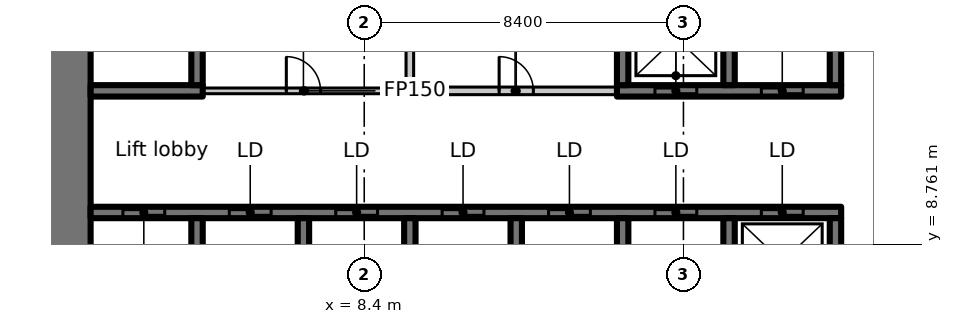
"""IFC4 building model, lengths in metres.
Left out: names, types, materials, properties, quantities, classifications, styles, units other than length and angle.
Written with IfcOpenShell. Run it as: python <this file> out.ifc"""

import sys

from ifc_helpers import new_model, si_unit, direction, frame, frame_2d, origin, place, context, subcontext, project, spatial, rectangle, extrude, element, fill, save


model = new_model("IFC4")
c1 = context("Model", 3, precision=1e-05, world=origin(), true_north=direction((0.0, 1.0)))
c2 = subcontext(c1, "Body", "Model", "MODEL_VIEW")
j1 = project(units=[si_unit("LENGTHUNIT", "METRE"), si_unit("PLANEANGLEUNIT", "RADIAN")], contexts=[c1])
p1 = place(None, origin())
s1 = spatial("IfcSite", under=j1, at=p1, CompositionType="ELEMENT")
p2 = place(p1, origin())
s2 = spatial("IfcBuilding", under=s1, at=p2, CompositionType="ELEMENT")
p3 = place(p2, origin())
s3 = spatial("IfcBuildingStorey", under=s2, at=p3, CompositionType="ELEMENT", Elevation=0.0)
p4 = place(p3, frame((0.6, 6.736, 0.0), z_axis=(0.0, 0.0, 1.0), x_axis=(0.0, 1.0, 0.0)))
e1 = element("IfcWall", 1, at=p4, inside=s3, PredefinedType="SHEAR", context=c2, shape_type="SweptSolid", body=[
    extrude(rectangle(XDim=8.864, YDim=1.2, at=frame_2d((4.432, 0.0))), origin(), (0.0, 0.0, 1.0), 6.75),
])
p5 = place(p3, frame((1.2, 9.6, 0.0), z_axis=(0.0, 0.0, 1.0), x_axis=(1.0, 0.0, 0.0)))
e2 = element("IfcWall", 2, at=p5, inside=s3, PredefinedType="SHEAR", context=c2, shape_type="SweptSolid", body=[
    extrude(rectangle(XDim=19.75, YDim=0.3, at=frame_2d((9.875, 0.0))), origin(), (0.0, 0.0, 1.0), 6.75),
])
p6 = place(p5, frame((0.85, 0.0, 0.0)))
e3 = element("IfcOpeningElement", 3, at=p6, cuts=e2, PredefinedType="OPENING", context=c2, shape_type="SweptSolid", body=[
    extrude(rectangle(XDim=1.1, YDim=2.3, at=frame_2d((0.55, 1.15))), frame((0.0, 0.16, 0.0), z_axis=(0.0, -1.0, 0.0), x_axis=(1.0, 0.0, 0.0)), (0.0, 0.0, 1.0), 0.32),
])
p7 = place(p5, frame((3.65, 0.0, 0.0)))
e4 = element("IfcOpeningElement", 4, at=p7, cuts=e2, PredefinedType="OPENING", context=c2, shape_type="SweptSolid", body=[
    extrude(rectangle(XDim=1.1, YDim=2.3, at=frame_2d((0.55, 1.15))), frame((0.0, 0.16, 0.0), z_axis=(0.0, -1.0, 0.0), x_axis=(1.0, 0.0, 0.0)), (0.0, 0.0, 1.0), 0.32),
])
p8 = place(p5, frame((6.45, 0.0, 0.0)))
e5 = element("IfcOpeningElement", 5, at=p8, cuts=e2, PredefinedType="OPENING", context=c2, shape_type="SweptSolid", body=[
    extrude(rectangle(XDim=1.1, YDim=2.3, at=frame_2d((0.55, 1.15))), frame((0.0, 0.16, 0.0), z_axis=(0.0, -1.0, 0.0), x_axis=(1.0, 0.0, 0.0)), (0.0, 0.0, 1.0), 0.32),
])
p9 = place(p5, frame((9.25, 0.0, 0.0)))
e6 = element("IfcOpeningElement", 6, at=p9, cuts=e2, PredefinedType="OPENING", context=c2, shape_type="SweptSolid", body=[
    extrude(rectangle(XDim=1.1, YDim=2.3, at=frame_2d((0.55, 1.15))), frame((0.0, 0.16, 0.0), z_axis=(0.0, -1.0, 0.0), x_axis=(1.0, 0.0, 0.0)), (0.0, 0.0, 1.0), 0.32),
])
p10 = place(p5, frame((12.05, 0.0, 0.0)))
e7 = element("IfcOpeningElement", 7, at=p10, cuts=e2, PredefinedType="OPENING", context=c2, shape_type="SweptSolid", body=[
    extrude(rectangle(XDim=1.1, YDim=2.3, at=frame_2d((0.55, 1.15))), frame((0.0, 0.16, 0.0), z_axis=(0.0, -1.0, 0.0), x_axis=(1.0, 0.0, 0.0)), (0.0, 0.0, 1.0), 0.32),
])
p11 = place(p5, frame((14.85, 0.0, 0.0)))
e8 = element("IfcOpeningElement", 8, at=p11, cuts=e2, PredefinedType="OPENING", context=c2, shape_type="SweptSolid", body=[
    extrude(rectangle(XDim=1.1, YDim=2.3, at=frame_2d((0.55, 1.15))), frame((0.0, 0.16, 0.0), z_axis=(0.0, -1.0, 0.0), x_axis=(1.0, 0.0, 0.0)), (0.0, 0.0, 1.0), 0.32),
])
p12 = place(p5, frame((17.65, 0.0, 0.0)))
e9 = element("IfcOpeningElement", 9, at=p12, cuts=e2, PredefinedType="OPENING", context=c2, shape_type="SweptSolid", body=[
    extrude(rectangle(XDim=1.1, YDim=2.3, at=frame_2d((0.55, 1.15))), frame((0.0, 0.16, 0.0), z_axis=(0.0, -1.0, 0.0), x_axis=(1.0, 0.0, 0.0)), (0.0, 0.0, 1.0), 0.32),
])
for number, where, z_axis, x_axis in (
    (10, (4.0, 7.15, 0.0), (0.0, 0.0, 1.0), (0.0, 1.0, 0.0)),
    (11, (6.8, 7.15, 0.0), (0.0, 0.0, 1.0), (0.0, 1.0, 0.0)),
    (12, (9.6, 7.15, 0.0), (0.0, 0.0, 1.0), (0.0, 1.0, 0.0)),
    (13, (12.4, 7.15, 0.0), (0.0, 0.0, 1.0), (0.0, 1.0, 0.0)),
    (14, (15.2, 7.15, 0.0), (0.0, 0.0, 1.0), (0.0, 1.0, 0.0)),
    (15, (18.0, 7.15, 0.0), (0.0, 0.0, 1.0), (0.0, 1.0, 0.0)),
    (16, (20.8, 7.15, 0.0), (0.0, 0.0, 1.0), (0.0, 1.0, 0.0)),
):
    element("IfcWall", number, at=place(p3, frame(where, z_axis=z_axis, x_axis=x_axis)), inside=s3, PredefinedType="SHEAR", context=c2, shape_type="SweptSolid", body=[
        extrude(rectangle(XDim=2.3, YDim=0.3, at=frame_2d((1.15, 0.0))), origin(), (0.0, 0.0, 1.0), 6.75),
    ])
p13 = place(p3, frame((1.2, 12.8, 0.0), z_axis=(0.0, 0.0, 1.0), x_axis=(1.0, 0.0, 0.0)))
e17 = element("IfcWall", 17, at=p13, inside=s3, PredefinedType="SHEAR", context=c2, shape_type="SweptSolid", body=[
    extrude(rectangle(XDim=2.95, YDim=0.3, at=frame_2d((1.475, 0.0))), origin(), (0.0, 0.0, 1.0), 6.75),
])
p14 = place(p3, frame((4.0, 12.95, 0.0), z_axis=(0.0, 0.0, 1.0), x_axis=(0.0, 1.0, 0.0)))
e18 = element("IfcWall", 18, at=p14, inside=s3, PredefinedType="SHEAR", context=c2, shape_type="SweptSolid", body=[
    extrude(rectangle(XDim=2.65, YDim=0.3, at=frame_2d((1.325, 0.0))), origin(), (0.0, 0.0, 1.0), 6.75),
])
p15 = place(p3, frame((15.05, 12.8, 0.0), z_axis=(0.0, 0.0, 1.0), x_axis=(1.0, 0.0, 0.0)))
e19 = element("IfcWall", 19, at=p15, inside=s3, PredefinedType="SHEAR", context=c2, shape_type="SweptSolid", body=[
    extrude(rectangle(XDim=5.9, YDim=0.3, at=frame_2d((2.95, 0.0))), origin(), (0.0, 0.0, 1.0), 6.75),
])
p16 = place(p15, frame((1.0, 0.0, 0.0)))
e20 = element("IfcOpeningElement", 20, at=p16, cuts=e19, PredefinedType="OPENING", context=c2, shape_type="SweptSolid", body=[
    extrude(rectangle(XDim=1.1, YDim=2.3, at=frame_2d((0.55, 1.15))), frame((0.0, 0.16, 0.0), z_axis=(0.0, -1.0, 0.0), x_axis=(1.0, 0.0, 0.0)), (0.0, 0.0, 1.0), 0.32),
])
p17 = place(p15, frame((3.8, 0.0, 0.0)))
e21 = element("IfcOpeningElement", 21, at=p17, cuts=e19, PredefinedType="OPENING", context=c2, shape_type="SweptSolid", body=[
    extrude(rectangle(XDim=1.1, YDim=2.3, at=frame_2d((0.55, 1.15))), frame((0.0, 0.16, 0.0), z_axis=(0.0, -1.0, 0.0), x_axis=(1.0, 0.0, 0.0)), (0.0, 0.0, 1.0), 0.32),
])
for number, where, z_axis, x_axis in (
    (22, (15.2, 12.95, 0.0), (0.0, 0.0, 1.0), (0.0, 1.0, 0.0)),
    (23, (18.0, 12.95, 0.0), (0.0, 0.0, 1.0), (0.0, 1.0, 0.0)),
    (24, (20.8, 12.95, 0.0), (0.0, 0.0, 1.0), (0.0, 1.0, 0.0)),
):
    element("IfcWall", number, at=place(p3, frame(where, z_axis=z_axis, x_axis=x_axis)), inside=s3, PredefinedType="SHEAR", context=c2, shape_type="SweptSolid", body=[
        extrude(rectangle(XDim=2.65, YDim=0.3, at=frame_2d((1.325, 0.0))), origin(), (0.0, 0.0, 1.0), 6.75),
    ])
p18 = place(p3, frame((9.6, 15.588, 0.0), z_axis=(0.0, 0.0, 1.0), x_axis=(0.0, -1.0, 0.0)))
e25 = element("IfcWall", 25, at=p18, inside=s3, PredefinedType="PARTITIONING", context=c2, shape_type="SweptSolid", body=[
    extrude(rectangle(XDim=2.788, YDim=0.2, at=frame_2d((1.394, 0.0))), origin(), (0.0, 0.0, 1.0), 6.75),
])
p19 = place(p3, frame((9.7, 12.8, 0.0), z_axis=(0.0, 0.0, 1.0), x_axis=(1.0, 0.0, 0.0)))
e26 = element("IfcWall", 26, at=p19, inside=s3, PredefinedType="PARTITIONING", context=c2, shape_type="SweptSolid", body=[
    extrude(rectangle(XDim=5.338, YDim=0.2, at=frame_2d((2.669, 0.0))), origin(), (0.0, 0.0, 1.0), 6.75),
])
p20 = place(p19, frame((2.25, 0.0, 0.0)))
e27 = element("IfcOpeningElement", 27, at=p20, cuts=e26, PredefinedType="OPENING", context=c2, shape_type="SweptSolid", body=[
    extrude(rectangle(XDim=0.9, YDim=2.1, at=frame_2d((0.45, 1.05))), frame((0.0, 0.11, 0.0), z_axis=(0.0, -1.0, 0.0), x_axis=(1.0, 0.0, 0.0)), (0.0, 0.0, 1.0), 0.22),
])
p21 = place(p3, frame((4.162, 12.8, 0.0), z_axis=(0.0, 0.0, 1.0), x_axis=(1.0, 0.0, 0.0)))
e28 = element("IfcWall", 28, at=p21, inside=s3, PredefinedType="PARTITIONING", context=c2, shape_type="SweptSolid", body=[
    extrude(rectangle(XDim=5.338, YDim=0.15, at=frame_2d((2.669, 0.0))), origin(), (0.0, 0.0, 1.0), 6.75),
])
p22 = place(p21, frame((2.188, 0.0, 0.0)))
e29 = element("IfcOpeningElement", 29, at=p22, cuts=e28, PredefinedType="OPENING", context=c2, shape_type="SweptSolid", body=[
    extrude(rectangle(XDim=0.9, YDim=2.1, at=frame_2d((0.45, 1.05))), frame((0.0, 0.085, 0.0), z_axis=(0.0, -1.0, 0.0), x_axis=(1.0, 0.0, 0.0)), (0.0, 0.0, 1.0), 0.17),
])
p23 = place(p6, origin())
e30 = element("IfcDoor", 30, at=p23, inside=s3, OperationType="SLIDING_TO_LEFT", PredefinedType="DOOR", context=c2, shape_type="SweptSolid", body=[
    extrude(rectangle(XDim=1.1, YDim=2.3, at=frame_2d((0.55, 1.15))), frame((0.0, 0.025, 0.0), z_axis=(0.0, -1.0, 0.0), x_axis=(1.0, 0.0, 0.0)), (0.0, 0.0, 1.0), 0.05),
])
fill(e3, e30)
p24 = place(p7, origin())
e31 = element("IfcDoor", 31, at=p24, inside=s3, OperationType="SLIDING_TO_LEFT", PredefinedType="DOOR", context=c2, shape_type="SweptSolid", body=[
    extrude(rectangle(XDim=1.1, YDim=2.3, at=frame_2d((0.55, 1.15))), frame((0.0, 0.025, 0.0), z_axis=(0.0, -1.0, 0.0), x_axis=(1.0, 0.0, 0.0)), (0.0, 0.0, 1.0), 0.05),
])
fill(e4, e31)
p25 = place(p8, origin())
e32 = element("IfcDoor", 32, at=p25, inside=s3, OperationType="SLIDING_TO_LEFT", PredefinedType="DOOR", context=c2, shape_type="SweptSolid", body=[
    extrude(rectangle(XDim=1.1, YDim=2.3, at=frame_2d((0.55, 1.15))), frame((0.0, 0.025, 0.0), z_axis=(0.0, -1.0, 0.0), x_axis=(1.0, 0.0, 0.0)), (0.0, 0.0, 1.0), 0.05),
])
fill(e5, e32)
p26 = place(p9, origin())
e33 = element("IfcDoor", 33, at=p26, inside=s3, OperationType="SLIDING_TO_LEFT", PredefinedType="DOOR", context=c2, shape_type="SweptSolid", body=[
    extrude(rectangle(XDim=1.1, YDim=2.3, at=frame_2d((0.55, 1.15))), frame((0.0, 0.025, 0.0), z_axis=(0.0, -1.0, 0.0), x_axis=(1.0, 0.0, 0.0)), (0.0, 0.0, 1.0), 0.05),
])
fill(e6, e33)
p27 = place(p10, origin())
e34 = element("IfcDoor", 34, at=p27, inside=s3, OperationType="SLIDING_TO_LEFT", PredefinedType="DOOR", context=c2, shape_type="SweptSolid", body=[
    extrude(rectangle(XDim=1.1, YDim=2.3, at=frame_2d((0.55, 1.15))), frame((0.0, 0.025, 0.0), z_axis=(0.0, -1.0, 0.0), x_axis=(1.0, 0.0, 0.0)), (0.0, 0.0, 1.0), 0.05),
])
fill(e7, e34)
p28 = place(p11, origin())
e35 = element("IfcDoor", 35, at=p28, inside=s3, OperationType="SLIDING_TO_LEFT", PredefinedType="DOOR", context=c2, shape_type="SweptSolid", body=[
    extrude(rectangle(XDim=1.1, YDim=2.3, at=frame_2d((0.55, 1.15))), frame((0.0, 0.025, 0.0), z_axis=(0.0, -1.0, 0.0), x_axis=(1.0, 0.0, 0.0)), (0.0, 0.0, 1.0), 0.05),
])
fill(e8, e35)
p29 = place(p12, origin())
e36 = element("IfcDoor", 36, at=p29, inside=s3, OperationType="SLIDING_TO_LEFT", PredefinedType="DOOR", context=c2, shape_type="SweptSolid", body=[
    extrude(rectangle(XDim=1.1, YDim=2.3, at=frame_2d((0.55, 1.15))), frame((0.0, 0.025, 0.0), z_axis=(0.0, -1.0, 0.0), x_axis=(1.0, 0.0, 0.0)), (0.0, 0.0, 1.0), 0.05),
])
fill(e9, e36)
p30 = place(p16, origin())
e37 = element("IfcDoor", 37, at=p30, inside=s3, OperationType="SLIDING_TO_LEFT", PredefinedType="DOOR", context=c2, shape_type="SweptSolid", body=[
    extrude(rectangle(XDim=1.1, YDim=2.3, at=frame_2d((0.55, 1.15))), frame((0.0, 0.025, 0.0), z_axis=(0.0, -1.0, 0.0), x_axis=(1.0, 0.0, 0.0)), (0.0, 0.0, 1.0), 0.05),
])
fill(e20, e37)
p31 = place(p17, origin())
e38 = element("IfcDoor", 38, at=p31, inside=s3, OperationType="SLIDING_TO_LEFT", PredefinedType="DOOR", context=c2, shape_type="SweptSolid", body=[
    extrude(rectangle(XDim=1.1, YDim=2.3, at=frame_2d((0.55, 1.15))), frame((0.0, 0.025, 0.0), z_axis=(0.0, -1.0, 0.0), x_axis=(1.0, 0.0, 0.0)), (0.0, 0.0, 1.0), 0.05),
])
fill(e21, e38)
p32 = place(p22, origin())
e39 = element("IfcDoor", 39, at=p32, inside=s3, OperationType="SINGLE_SWING_RIGHT", PredefinedType="DOOR", context=c2, shape_type="SweptSolid", body=[
    extrude(rectangle(XDim=0.9, YDim=2.1, at=frame_2d((0.45, 1.05))), frame((0.0, 0.025, 0.0), z_axis=(0.0, -1.0, 0.0), x_axis=(1.0, 0.0, 0.0)), (0.0, 0.0, 1.0), 0.05),
])
fill(e29, e39)
p33 = place(p20, origin())
e40 = element("IfcDoor", 40, at=p33, inside=s3, OperationType="SINGLE_SWING_LEFT", PredefinedType="DOOR", context=c2, shape_type="SweptSolid", body=[
    extrude(rectangle(XDim=0.9, YDim=2.1, at=frame_2d((0.45, 1.05))), frame((0.0, 0.025, 0.0), z_axis=(0.0, -1.0, 0.0), x_axis=(1.0, 0.0, 0.0)), (0.0, 0.0, 1.0), 0.05),
])
fill(e27, e40)
save(model, sys.argv[1])
